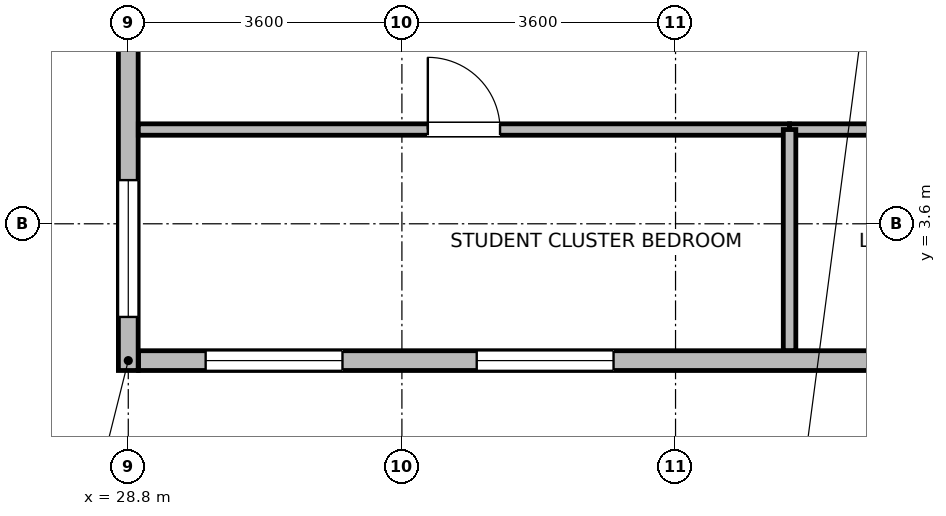
"""IFC4 building model, lengths in metres.
Left out: names, types, materials, properties, quantities, classifications, styles, units other than length and angle.
Written with IfcOpenShell. Run it as: python <this file> out.ifc"""

import sys

from ifc_helpers import new_model, si_unit, direction, frame, frame_2d, origin, place, context, subcontext, project, spatial, rectangle, extrude, element, fill, save


model = new_model("IFC4")
c1 = context("Model", 3, precision=1e-05, world=origin(), true_north=direction((0.0, 1.0)))
c2 = subcontext(c1, "Body", "Model", "MODEL_VIEW")
j1 = project(units=[si_unit("LENGTHUNIT", "METRE"), si_unit("PLANEANGLEUNIT", "RADIAN")], contexts=[c1])
p1 = place(None, origin())
s1 = spatial("IfcSite", under=j1, at=p1, CompositionType="ELEMENT")
p2 = place(p1, origin())
s2 = spatial("IfcBuilding", under=s1, at=p2, CompositionType="ELEMENT")
p3 = place(p2, frame((0.0, 0.0, 47.5)))
s3 = spatial("IfcBuildingStorey", under=s2, at=p3, CompositionType="ELEMENT", Elevation=47.5)
p4 = place(p3, frame((57.465, 1.8, 0.0), z_axis=(0.0, 0.0, 1.0), x_axis=(-1.0, 0.0, 0.0)))
e1 = element("IfcWall", 1, at=p4, inside=s3, PredefinedType="STANDARD", context=c2, shape_type="SweptSolid", body=[
    extrude(rectangle(XDim=28.53, YDim=0.26, at=frame_2d((14.265, 0.0))), origin(), (0.0, 0.0, 1.0), 3.43),
])
p5 = place(p4, frame((0.883, 0.0, 0.85)))
e2 = element("IfcOpeningElement", 2, at=p5, cuts=e1, PredefinedType="OPENING", context=c2, shape_type="SweptSolid", body=[
    extrude(rectangle(XDim=1.8, YDim=1.85, at=frame_2d((0.9, 0.925))), frame((0.0, 0.14, 0.0), z_axis=(0.0, -1.0, 0.0), x_axis=(1.0, 0.0, 0.0)), (0.0, 0.0, 1.0), 0.28),
])
p6 = place(p4, frame((4.449, 0.0, 0.85)))
e3 = element("IfcOpeningElement", 3, at=p6, cuts=e1, PredefinedType="OPENING", context=c2, shape_type="SweptSolid", body=[
    extrude(rectangle(XDim=1.8, YDim=1.85, at=frame_2d((0.9, 0.925))), frame((0.0, 0.14, 0.0), z_axis=(0.0, -1.0, 0.0), x_axis=(1.0, 0.0, 0.0)), (0.0, 0.0, 1.0), 0.28),
])
p7 = place(p4, frame((8.016, 0.0, 0.85)))
e4 = element("IfcOpeningElement", 4, at=p7, cuts=e1, PredefinedType="OPENING", context=c2, shape_type="SweptSolid", body=[
    extrude(rectangle(XDim=1.8, YDim=1.85, at=frame_2d((0.9, 0.925))), frame((0.0, 0.14, 0.0), z_axis=(0.0, -1.0, 0.0), x_axis=(1.0, 0.0, 0.0)), (0.0, 0.0, 1.0), 0.28),
])
p8 = place(p4, frame((11.582, 0.0, 0.85)))
e5 = element("IfcOpeningElement", 5, at=p8, cuts=e1, PredefinedType="OPENING", context=c2, shape_type="SweptSolid", body=[
    extrude(rectangle(XDim=1.8, YDim=1.85, at=frame_2d((0.9, 0.925))), frame((0.0, 0.14, 0.0), z_axis=(0.0, -1.0, 0.0), x_axis=(1.0, 0.0, 0.0)), (0.0, 0.0, 1.0), 0.28),
])
p9 = place(p4, frame((15.148, 0.0, 0.85)))
e6 = element("IfcOpeningElement", 6, at=p9, cuts=e1, PredefinedType="OPENING", context=c2, shape_type="SweptSolid", body=[
    extrude(rectangle(XDim=1.8, YDim=1.85, at=frame_2d((0.9, 0.925))), frame((0.0, 0.14, 0.0), z_axis=(0.0, -1.0, 0.0), x_axis=(1.0, 0.0, 0.0)), (0.0, 0.0, 1.0), 0.28),
])
p10 = place(p4, frame((22.281, 0.0, 0.85)))
e7 = element("IfcOpeningElement", 7, at=p10, cuts=e1, PredefinedType="OPENING", context=c2, shape_type="SweptSolid", body=[
    extrude(rectangle(XDim=1.8, YDim=1.85, at=frame_2d((0.9, 0.925))), frame((0.0, 0.14, 0.0), z_axis=(0.0, -1.0, 0.0), x_axis=(1.0, 0.0, 0.0)), (0.0, 0.0, 1.0), 0.28),
])
p11 = place(p4, frame((25.847, 0.0, 0.85)))
e8 = element("IfcOpeningElement", 8, at=p11, cuts=e1, PredefinedType="OPENING", context=c2, shape_type="SweptSolid", body=[
    extrude(rectangle(XDim=1.8, YDim=1.85, at=frame_2d((0.9, 0.925))), frame((0.0, 0.14, 0.0), z_axis=(0.0, -1.0, 0.0), x_axis=(1.0, 0.0, 0.0)), (0.0, 0.0, 1.0), 0.28),
])
p12 = place(p3, frame((28.8, 1.67, 0.0), z_axis=(0.0, 0.0, 1.0), x_axis=(0.0, 1.0, 0.0)))
e9 = element("IfcWall", 9, at=p12, inside=s3, PredefinedType="STANDARD", context=c2, shape_type="SweptSolid", body=[
    extrude(rectangle(XDim=19.254, YDim=0.26, at=frame_2d((9.627, 0.0))), origin(), (0.0, 0.0, 1.0), 3.43),
])
p13 = place(p12, frame((0.705, 0.0, 0.85)))
e10 = element("IfcOpeningElement", 10, at=p13, cuts=e9, PredefinedType="OPENING", context=c2, shape_type="SweptSolid", body=[
    extrude(rectangle(XDim=1.8, YDim=1.85, at=frame_2d((0.9, 0.925))), frame((0.0, 0.14, 0.0), z_axis=(0.0, -1.0, 0.0), x_axis=(1.0, 0.0, 0.0)), (0.0, 0.0, 1.0), 0.28),
])
p14 = place(p12, frame((7.123, 0.0, 0.85)))
e11 = element("IfcOpeningElement", 11, at=p14, cuts=e9, PredefinedType="OPENING", context=c2, shape_type="SweptSolid", body=[
    extrude(rectangle(XDim=1.8, YDim=1.85, at=frame_2d((0.9, 0.925))), frame((0.0, 0.14, 0.0), z_axis=(0.0, -1.0, 0.0), x_axis=(1.0, 0.0, 0.0)), (0.0, 0.0, 1.0), 0.28),
])
p15 = place(p12, frame((10.332, 0.0, 0.85)))
e12 = element("IfcOpeningElement", 12, at=p15, cuts=e9, PredefinedType="OPENING", context=c2, shape_type="SweptSolid", body=[
    extrude(rectangle(XDim=1.8, YDim=1.85, at=frame_2d((0.9, 0.925))), frame((0.0, 0.14, 0.0), z_axis=(0.0, -1.0, 0.0), x_axis=(1.0, 0.0, 0.0)), (0.0, 0.0, 1.0), 0.28),
])
p16 = place(p12, frame((13.541, 0.0, 0.85)))
e13 = element("IfcOpeningElement", 13, at=p16, cuts=e9, PredefinedType="OPENING", context=c2, shape_type="SweptSolid", body=[
    extrude(rectangle(XDim=1.8, YDim=1.85, at=frame_2d((0.9, 0.925))), frame((0.0, 0.14, 0.0), z_axis=(0.0, -1.0, 0.0), x_axis=(1.0, 0.0, 0.0)), (0.0, 0.0, 1.0), 0.28),
])
p17 = place(p12, frame((16.75, 0.0, 0.85)))
e14 = element("IfcOpeningElement", 14, at=p17, cuts=e9, PredefinedType="OPENING", context=c2, shape_type="SweptSolid", body=[
    extrude(rectangle(XDim=1.8, YDim=1.85, at=frame_2d((0.9, 0.925))), frame((0.0, 0.14, 0.0), z_axis=(0.0, -1.0, 0.0), x_axis=(1.0, 0.0, 0.0)), (0.0, 0.0, 1.0), 0.28),
])
p18 = place(p3, frame((37.5, 4.84, 0.0), z_axis=(0.0, 0.0, 1.0), x_axis=(1.0, 0.0, 0.0)))
e15 = element("IfcWall", 15, at=p18, inside=s3, PredefinedType="PARTITIONING", context=c2, shape_type="SweptSolid", body=[
    extrude(rectangle(XDim=9.2, YDim=0.15, at=frame_2d((4.6, 0.0))), origin(), (0.0, 0.0, 1.0), 3.43),
])
p19 = place(p18, frame((4.125, 0.0, 0.0)))
e16 = element("IfcOpeningElement", 16, at=p19, cuts=e15, PredefinedType="OPENING", context=c2, shape_type="SweptSolid", body=[
    extrude(rectangle(XDim=0.95, YDim=2.1, at=frame_2d((0.475, 1.05))), frame((0.0, 0.085, 0.0), z_axis=(0.0, -1.0, 0.0), x_axis=(1.0, 0.0, 0.0)), (0.0, 0.0, 1.0), 0.17),
])
p20 = place(p3, frame((28.932, 4.84, 0.0), z_axis=(0.0, 0.0, 1.0), x_axis=(1.0, 0.0, 0.0)))
e17 = element("IfcWall", 17, at=p20, inside=s3, PredefinedType="PARTITIONING", context=c2, shape_type="SweptSolid", body=[
    extrude(rectangle(XDim=8.568, YDim=0.15, at=frame_2d((4.284, 0.0))), origin(), (0.0, 0.0, 1.0), 3.43),
])
p21 = place(p20, frame((3.809, 0.0, 0.0)))
e18 = element("IfcOpeningElement", 18, at=p21, cuts=e17, PredefinedType="OPENING", context=c2, shape_type="SweptSolid", body=[
    extrude(rectangle(XDim=0.95, YDim=2.1, at=frame_2d((0.475, 1.05))), frame((0.0, 0.085, 0.0), z_axis=(0.0, -1.0, 0.0), x_axis=(1.0, 0.0, 0.0)), (0.0, 0.0, 1.0), 0.17),
])
p22 = place(p3, frame((37.5, 1.932, 0.0), z_axis=(0.0, 0.0, 1.0), x_axis=(0.0, 1.0, 0.0)))
e19 = element("IfcWall", 19, at=p22, inside=s3, PredefinedType="PARTITIONING", context=c2, shape_type="SweptSolid", body=[
    extrude(rectangle(XDim=2.908, YDim=0.165, at=frame_2d((1.454, 0.0))), origin(), (0.0, 0.0, 1.0), 3.43),
])
p23 = place(p10, origin())
e20 = element("IfcWindow", 20, at=p23, inside=s3, PartitioningType="SINGLE_PANEL", PredefinedType="WINDOW", context=c2, shape_type="SweptSolid", body=[
    extrude(rectangle(XDim=1.8, YDim=1.85, at=frame_2d((0.9, 0.925))), frame((0.0, 0.03, 0.0), z_axis=(0.0, -1.0, 0.0), x_axis=(1.0, 0.0, 0.0)), (0.0, 0.0, 1.0), 0.06),
])
fill(e7, e20)
p24 = place(p11, origin())
e21 = element("IfcWindow", 21, at=p24, inside=s3, PartitioningType="SINGLE_PANEL", PredefinedType="WINDOW", context=c2, shape_type="SweptSolid", body=[
    extrude(rectangle(XDim=1.8, YDim=1.85, at=frame_2d((0.9, 0.925))), frame((0.0, 0.03, 0.0), z_axis=(0.0, -1.0, 0.0), x_axis=(1.0, 0.0, 0.0)), (0.0, 0.0, 1.0), 0.06),
])
fill(e8, e21)
p25 = place(p13, origin())
e22 = element("IfcWindow", 22, at=p25, inside=s3, PartitioningType="SINGLE_PANEL", PredefinedType="WINDOW", context=c2, shape_type="SweptSolid", body=[
    extrude(rectangle(XDim=1.8, YDim=1.85, at=frame_2d((0.9, 0.925))), frame((0.0, 0.03, 0.0), z_axis=(0.0, -1.0, 0.0), x_axis=(1.0, 0.0, 0.0)), (0.0, 0.0, 1.0), 0.06),
])
fill(e10, e22)
p26 = place(p21, origin())
e23 = element("IfcDoor", 23, at=p26, inside=s3, OperationType="SINGLE_SWING_LEFT", PredefinedType="DOOR", context=c2, shape_type="SweptSolid", body=[
    extrude(rectangle(XDim=0.95, YDim=2.1, at=frame_2d((0.475, 1.05))), frame((0.0, 0.025, 0.0), z_axis=(0.0, -1.0, 0.0), x_axis=(1.0, 0.0, 0.0)), (0.0, 0.0, 1.0), 0.05),
])
fill(e18, e23)
save(model, sys.argv[1])
